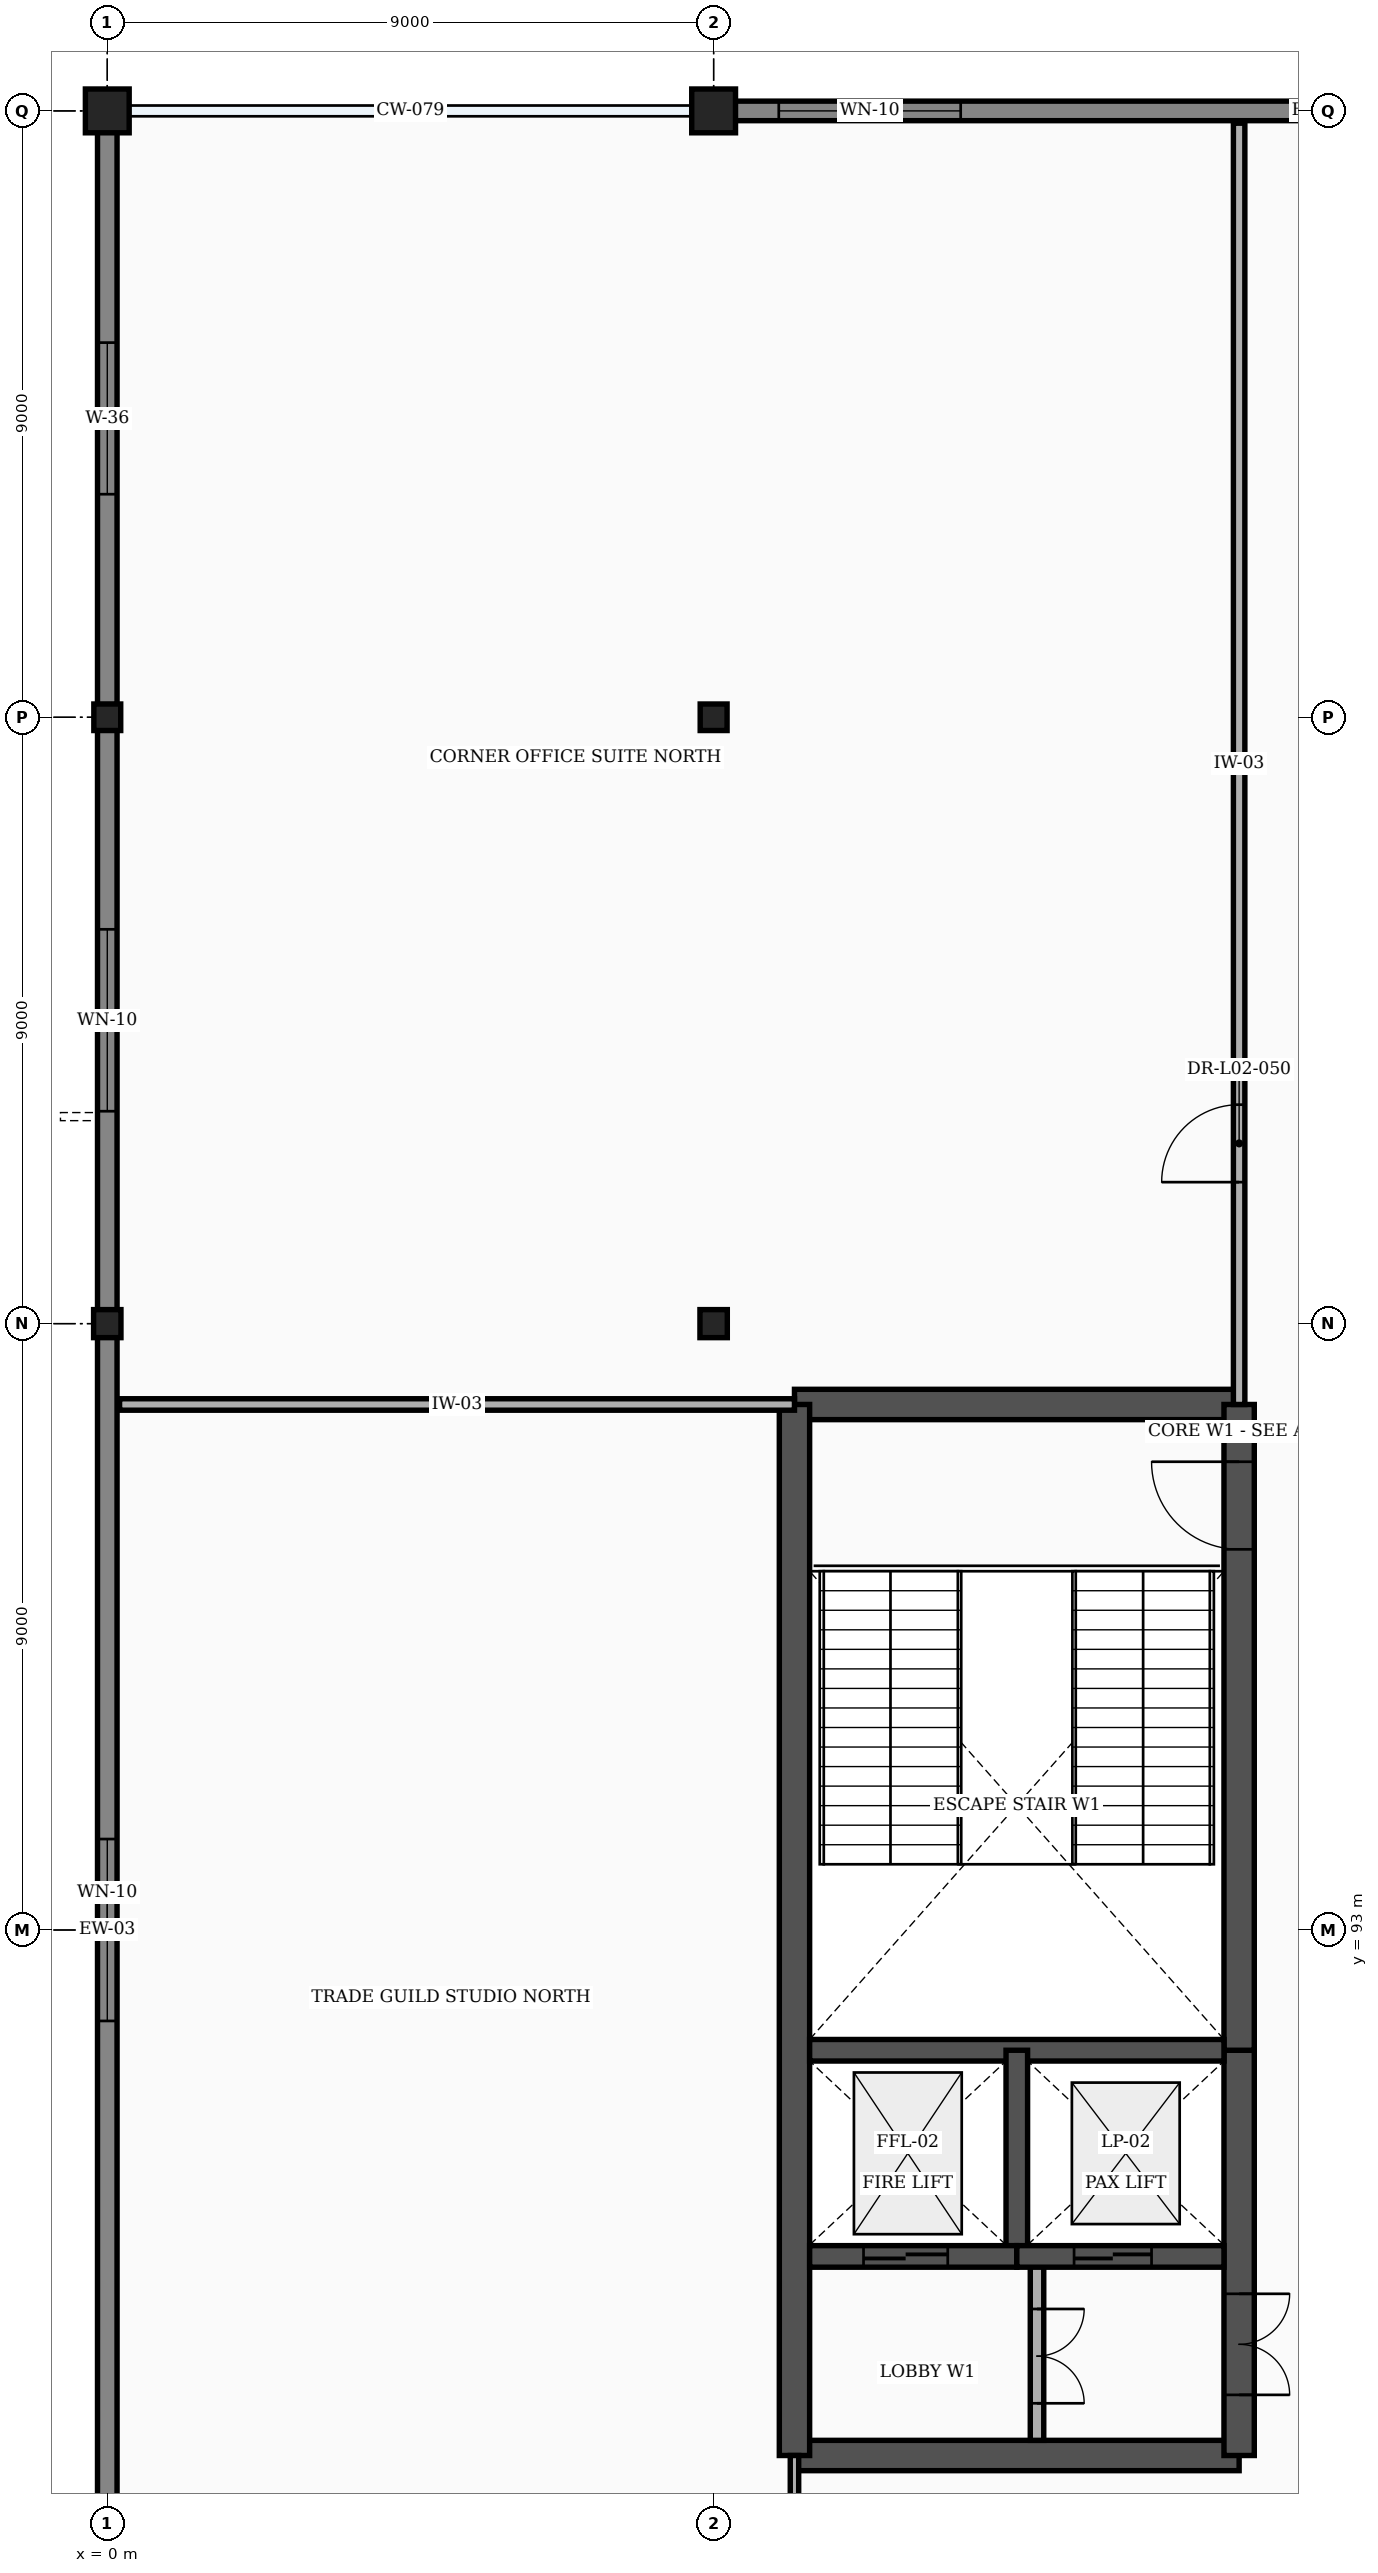
"""IFC4 building model, lengths in metres.
Left out: names, types, materials, properties, quantities, classifications, styles, units other than length and angle.
Written with IfcOpenShell. Run it as: python <this file> out.ifc"""

import sys

from ifc_helpers import new_model, si_unit, direction, frame, frame_2d, origin, origin_2d, place, context, subcontext, project, spatial, rectangle, i_section, extrude, element, fill, save


model = new_model("IFC4")
c1 = context("Model", 3, precision=1e-05, world=origin(), true_north=direction((0.0, 1.0)))
c2 = subcontext(c1, "Body", "Model", "MODEL_VIEW")
j1 = project(units=[si_unit("LENGTHUNIT", "METRE"), si_unit("PLANEANGLEUNIT", "RADIAN")], contexts=[c1])
p1 = place(None, origin())
s1 = spatial("IfcSite", under=j1, at=p1, CompositionType="ELEMENT")
p2 = place(p1, origin())
s2 = spatial("IfcBuilding", under=s1, at=p2, CompositionType="ELEMENT")
p3 = place(p2, frame((0.0, 0.0, 11.4)))
s3 = spatial("IfcBuildingStorey", under=s2, at=p3, CompositionType="ELEMENT", Elevation=11.4)
p4 = place(p3, frame((0.0, 102.0, 0.0), z_axis=(0.0, 0.0, 1.0), x_axis=(1.0, 0.0, 0.0)))
e1 = element("IfcColumn", 1, at=p4, inside=s3, PredefinedType="COLUMN", context=c2, shape_type="SweptSolid", body=[
    extrude(i_section(OverallWidth=0.406, OverallDepth=0.416, WebThickness=0.03, FlangeThickness=0.048, at=origin_2d()), origin(), (0.0, 0.0, 1.0), 5.4),
])
p5 = place(p3, frame((0.0, 111.0, 0.0), z_axis=(0.0, 0.0, 1.0), x_axis=(1.0, 0.0, 0.0)))
e2 = element("IfcColumn", 2, at=p5, inside=s3, PredefinedType="COLUMN", context=c2, shape_type="SweptSolid", body=[
    extrude(i_section(OverallWidth=0.399, OverallDepth=0.394, WebThickness=0.023, FlangeThickness=0.037, at=origin_2d()), origin(), (0.0, 0.0, 1.0), 5.4),
])
p6 = place(p3, frame((0.0, 120.0, 0.0), z_axis=(0.0, 0.0, 1.0), x_axis=(1.0, 0.0, 0.0)))
e3 = element("IfcColumn", 3, at=p6, inside=s3, PredefinedType="COLUMN", context=c2, shape_type="SweptSolid", body=[
    extrude(rectangle(XDim=0.65, YDim=0.65, at=origin_2d()), origin(), (0.0, 0.0, 1.0), 5.4),
])
p7 = place(p3, frame((9.0, 102.0, 0.0), z_axis=(0.0, 0.0, 1.0), x_axis=(1.0, 0.0, 0.0)))
e4 = element("IfcColumn", 4, at=p7, inside=s3, PredefinedType="COLUMN", context=c2, shape_type="SweptSolid", body=[
    extrude(i_section(OverallWidth=0.406, OverallDepth=0.416, WebThickness=0.03, FlangeThickness=0.048, at=origin_2d()), origin(), (0.0, 0.0, 1.0), 5.4),
])
p8 = place(p3, frame((9.0, 111.0, 0.0), z_axis=(0.0, 0.0, 1.0), x_axis=(1.0, 0.0, 0.0)))
e5 = element("IfcColumn", 5, at=p8, inside=s3, PredefinedType="COLUMN", context=c2, shape_type="SweptSolid", body=[
    extrude(i_section(OverallWidth=0.399, OverallDepth=0.394, WebThickness=0.023, FlangeThickness=0.037, at=origin_2d()), origin(), (0.0, 0.0, 1.0), 5.4),
])
p9 = place(p3, frame((9.0, 120.0, 0.0), z_axis=(0.0, 0.0, 1.0), x_axis=(1.0, 0.0, 0.0)))
e6 = element("IfcColumn", 6, at=p9, inside=s3, PredefinedType="COLUMN", context=c2, shape_type="SweptSolid", body=[
    extrude(rectangle(XDim=0.65, YDim=0.65, at=origin_2d()), origin(), (0.0, 0.0, 1.0), 5.4),
])
p10 = place(p3, frame((9.317, 120.0, 0.0), z_axis=(0.0, 0.0, 1.0), x_axis=(1.0, 0.0, 0.0)))
e7 = element("IfcWall", 7, at=p10, inside=s3, PredefinedType="STANDARD", context=c2, shape_type="SweptSolid", body=[
    extrude(rectangle(XDim=17.366, YDim=0.29, at=frame_2d((8.683, 0.0))), origin(), (0.0, 0.0, 1.0), 4.388),
])
p11 = place(p10, frame((0.65, 0.0, 0.85)))
e8 = element("IfcOpeningElement", 8, at=p11, cuts=e7, PredefinedType="OPENING", context=c2, shape_type="SweptSolid", body=[
    extrude(rectangle(XDim=2.7, YDim=2.4, at=frame_2d((1.35, 1.2))), frame((0.0, 0.157, 0.0), z_axis=(0.0, -1.0, 0.0), x_axis=(1.0, 0.0, 0.0)), (0.0, 0.0, 1.0), 0.314),
])
p12 = place(p3, frame((0.0, 84.194, 0.0), z_axis=(0.0, 0.0, 1.0), x_axis=(0.0, 1.0, 0.0)))
e9 = element("IfcWall", 9, at=p12, inside=s3, PredefinedType="STANDARD", context=c2, shape_type="SweptSolid", body=[
    extrude(rectangle(XDim=17.612, YDim=0.29, at=frame_2d((8.806, 0.0))), origin(), (0.0, 0.0, 1.0), 4.467),
])
p13 = place(p12, frame((7.456, 0.0, 0.85)))
e10 = element("IfcOpeningElement", 10, at=p13, cuts=e9, PredefinedType="OPENING", context=c2, shape_type="SweptSolid", body=[
    extrude(rectangle(XDim=2.7, YDim=2.4, at=frame_2d((1.35, 1.2))), frame((0.0, 0.157, 0.0), z_axis=(0.0, -1.0, 0.0), x_axis=(1.0, 0.0, 0.0)), (0.0, 0.0, 1.0), 0.314),
])
p14 = place(p3, frame((0.0, 102.194, 0.0), z_axis=(0.0, 0.0, 1.0), x_axis=(0.0, 1.0, 0.0)))
e11 = element("IfcWall", 11, at=p14, inside=s3, PredefinedType="STANDARD", context=c2, shape_type="SweptSolid", body=[
    extrude(rectangle(XDim=8.617, YDim=0.29, at=frame_2d((4.309, 0.0))), origin(), (0.0, 0.0, 1.0), 4.9),
])
p15 = place(p14, frame((2.959, 0.0, 0.85)))
e12 = element("IfcOpeningElement", 12, at=p15, cuts=e11, PredefinedType="OPENING", context=c2, shape_type="SweptSolid", body=[
    extrude(rectangle(XDim=2.7, YDim=2.4, at=frame_2d((1.35, 1.2))), frame((0.0, 0.157, 0.0), z_axis=(0.0, -1.0, 0.0), x_axis=(1.0, 0.0, 0.0)), (0.0, 0.0, 1.0), 0.314),
])
p16 = place(p3, frame((0.0, 111.189, 0.0), z_axis=(0.0, 0.0, 1.0), x_axis=(0.0, 1.0, 0.0)))
e13 = element("IfcWall", 13, at=p16, inside=s3, PredefinedType="STANDARD", context=c2, shape_type="SweptSolid", body=[
    extrude(rectangle(XDim=8.494, YDim=0.29, at=frame_2d((4.247, 0.0))), origin(), (0.0, 0.0, 1.0), 4.9),
])
p17 = place(p16, frame((3.122, 0.0, 0.85)))
e14 = element("IfcOpeningElement", 14, at=p17, cuts=e13, PredefinedType="OPENING", context=c2, shape_type="SweptSolid", body=[
    extrude(rectangle(XDim=2.25, YDim=2.0, at=frame_2d((1.125, 1.0))), frame((0.0, 0.157, 0.0), z_axis=(0.0, -1.0, 0.0), x_axis=(1.0, 0.0, 0.0)), (0.0, 0.0, 1.0), 0.314),
])
for number, where, z_axis, x_axis in (
    (15, (10.2, 85.2, 0.0), (0.0, 0.0, 1.0), (1.0, 0.0, 0.0)),
    (16, (10.2, 100.8, 0.0), (0.0, 0.0, 1.0), (1.0, 0.0, 0.0)),
):
    element("IfcWall", number, at=place(p3, frame(where, z_axis=z_axis, x_axis=x_axis)), inside=s3, PredefinedType="SHEAR", context=c2, shape_type="SweptSolid", body=[
        extrude(rectangle(XDim=6.6, YDim=0.45, at=frame_2d((3.3, 0.0))), origin(), (0.0, 0.0, 1.0), 5.15),
    ])
p18 = place(p3, frame((10.2, 85.2, 0.0), z_axis=(0.0, 0.0, 1.0), x_axis=(0.0, 1.0, 0.0)))
e17 = element("IfcWall", 17, at=p18, inside=s3, PredefinedType="SHEAR", context=c2, shape_type="SweptSolid", body=[
    extrude(rectangle(XDim=15.6, YDim=0.45, at=frame_2d((7.8, 0.0))), origin(), (0.0, 0.0, 1.0), 5.15),
])
p19 = place(p3, frame((16.8, 85.2, 0.0), z_axis=(0.0, 0.0, 1.0), x_axis=(0.0, 1.0, 0.0)))
e18 = element("IfcWall", 18, at=p19, inside=s3, PredefinedType="SHEAR", context=c2, shape_type="SweptSolid", body=[
    extrude(rectangle(XDim=6.015, YDim=0.45, at=frame_2d((3.008, 0.0))), origin(), (0.0, 0.0, 1.0), 5.15),
])
p20 = place(p19, frame((0.9, 0.0, 0.0)))
e19 = element("IfcOpeningElement", 19, at=p20, cuts=e18, PredefinedType="OPENING", context=c2, shape_type="SweptSolid", body=[
    extrude(rectangle(XDim=1.5, YDim=2.2, at=frame_2d((0.75, 1.1))), frame((0.0, 0.237, 0.0), z_axis=(0.0, -1.0, 0.0), x_axis=(1.0, 0.0, 0.0)), (0.0, 0.0, 1.0), 0.474),
])
p21 = place(p3, frame((16.8, 91.215, 0.0), z_axis=(0.0, 0.0, 1.0), x_axis=(0.0, 1.0, 0.0)))
e20 = element("IfcWall", 20, at=p21, inside=s3, PredefinedType="SHEAR", context=c2, shape_type="SweptSolid", body=[
    extrude(rectangle(XDim=9.585, YDim=0.45, at=frame_2d((4.792, 0.0))), origin(), (0.0, 0.0, 1.0), 5.15),
])
p22 = place(p21, frame((7.435, 0.0, 0.0)))
e21 = element("IfcOpeningElement", 21, at=p22, cuts=e20, PredefinedType="OPENING", context=c2, shape_type="SweptSolid", body=[
    extrude(rectangle(XDim=1.3, YDim=2.2, at=frame_2d((0.65, 1.1))), frame((0.0, 0.237, 0.0), z_axis=(0.0, -1.0, 0.0), x_axis=(1.0, 0.0, 0.0)), (0.0, 0.0, 1.0), 0.474),
])
p23 = place(p3, frame((10.425, 91.215, 0.0), z_axis=(0.0, 0.0, 1.0), x_axis=(1.0, 0.0, 0.0)))
e22 = element("IfcWall", 22, at=p23, inside=s3, PredefinedType="SHEAR", context=c2, shape_type="SweptSolid", body=[
    extrude(rectangle(XDim=6.15, YDim=0.32, at=frame_2d((3.075, 0.0))), origin(), (0.0, 0.0, 1.0), 5.15),
])
p24 = place(p3, frame((13.5, 88.155, 0.0), z_axis=(0.0, 0.0, 1.0), x_axis=(0.0, 1.0, 0.0)))
e23 = element("IfcWall", 23, at=p24, inside=s3, PredefinedType="SHEAR", context=c2, shape_type="SweptSolid", body=[
    extrude(rectangle(XDim=3.06, YDim=0.32, at=frame_2d((1.53, 0.0))), origin(), (0.0, 0.0, 1.0), 5.15),
])
p25 = place(p3, frame((13.8, 85.425, 0.0), z_axis=(0.0, 0.0, 1.0), x_axis=(0.0, 1.0, 0.0)))
e24 = element("IfcWall", 24, at=p25, inside=s3, PredefinedType="PARTITIONING", context=c2, shape_type="SweptSolid", body=[
    extrude(rectangle(XDim=2.73, YDim=0.2, at=frame_2d((1.365, 0.0))), origin(), (0.0, 0.0, 1.0), 5.15),
])
p26 = place(p25, frame((0.55, 0.0, 0.0)))
e25 = element("IfcOpeningElement", 25, at=p26, cuts=e24, PredefinedType="OPENING", context=c2, shape_type="SweptSolid", body=[
    extrude(rectangle(XDim=1.4, YDim=2.25, at=frame_2d((0.7, 1.125))), frame((0.0, 0.112, 0.0), z_axis=(0.0, -1.0, 0.0), x_axis=(1.0, 0.0, 0.0)), (0.0, 0.0, 1.0), 0.224),
])
p27 = place(p3, frame((10.425, 88.155, 0.0), z_axis=(0.0, 0.0, 1.0), x_axis=(1.0, 0.0, 0.0)))
e26 = element("IfcWall", 26, at=p27, inside=s3, PredefinedType="SHEAR", context=c2, shape_type="SweptSolid", body=[
    extrude(rectangle(XDim=3.075, YDim=0.32, at=frame_2d((1.538, 0.0))), origin(), (0.0, 0.0, 1.0), 5.15),
])
p28 = place(p27, frame((0.8, 0.0, 0.0)))
e27 = element("IfcOpeningElement", 27, at=p28, cuts=e26, PredefinedType="OPENING", context=c2, shape_type="SweptSolid", body=[
    extrude(rectangle(XDim=1.25, YDim=2.25, at=frame_2d((0.625, 1.125))), frame((0.0, 0.172, 0.0), z_axis=(0.0, -1.0, 0.0), x_axis=(1.0, 0.0, 0.0)), (0.0, 0.0, 1.0), 0.344),
])
p29 = place(p3, frame((13.5, 88.155, 0.0), z_axis=(0.0, 0.0, 1.0), x_axis=(1.0, 0.0, 0.0)))
e28 = element("IfcWall", 28, at=p29, inside=s3, PredefinedType="SHEAR", context=c2, shape_type="SweptSolid", body=[
    extrude(rectangle(XDim=3.075, YDim=0.32, at=frame_2d((1.538, 0.0))), origin(), (0.0, 0.0, 1.0), 5.15),
])
p30 = place(p29, frame((0.85, 0.0, 0.0)))
e29 = element("IfcOpeningElement", 29, at=p30, cuts=e28, PredefinedType="OPENING", context=c2, shape_type="SweptSolid", body=[
    extrude(rectangle(XDim=1.15, YDim=2.2, at=frame_2d((0.575, 1.1))), frame((0.0, 0.172, 0.0), z_axis=(0.0, -1.0, 0.0), x_axis=(1.0, 0.0, 0.0)), (0.0, 0.0, 1.0), 0.344),
])
p31 = place(p3, frame((10.2, 83.2, 0.0), z_axis=(0.0, 0.0, 1.0), x_axis=(0.0, 1.0, 0.0)))
e30 = element("IfcWall", 30, at=p31, inside=s3, PredefinedType="PARTITIONING", context=c2, shape_type="SweptSolid", body=[
    extrude(rectangle(XDim=2.0, YDim=0.125, at=frame_2d((1.0, 0.0))), origin(), (0.0, 0.0, 1.0), 5.15),
])
p32 = place(p3, frame((0.183, 100.8, 0.0), z_axis=(0.0, 0.0, 1.0), x_axis=(1.0, 0.0, 0.0)))
e31 = element("IfcWall", 31, at=p32, inside=s3, PredefinedType="PARTITIONING", context=c2, shape_type="SweptSolid", body=[
    extrude(rectangle(XDim=10.017, YDim=0.17, at=frame_2d((5.009, 0.0))), origin(), (0.0, 0.0, 1.0), 5.15),
])
p33 = place(p3, frame((16.8, 100.8, 0.0), z_axis=(0.0, 0.0, 1.0), x_axis=(0.0, 1.0, 0.0)))
e32 = element("IfcWall", 32, at=p33, inside=s3, PredefinedType="PARTITIONING", context=c2, shape_type="SweptSolid", body=[
    extrude(rectangle(XDim=19.017, YDim=0.17, at=frame_2d((9.509, 0.0))), origin(), (0.0, 0.0, 1.0), 5.15),
])
p34 = place(p33, frame((3.3, 0.0, 0.0)))
e33 = element("IfcOpeningElement", 33, at=p34, cuts=e32, PredefinedType="OPENING", context=c2, shape_type="SweptSolid", body=[
    extrude(rectangle(XDim=1.15, YDim=2.15, at=frame_2d((0.575, 1.075))), frame((0.0, 0.097, 0.0), z_axis=(0.0, -1.0, 0.0), x_axis=(1.0, 0.0, 0.0)), (0.0, 0.0, 1.0), 0.194),
])
p35 = place(p11, origin())
e34 = element("IfcWindow", 34, at=p35, inside=s3, PartitioningType="SINGLE_PANEL", PredefinedType="WINDOW", context=c2, shape_type="SweptSolid", body=[
    extrude(rectangle(XDim=2.7, YDim=2.4, at=frame_2d((1.35, 1.2))), frame((0.0, 0.03, 0.0), z_axis=(0.0, -1.0, 0.0), x_axis=(1.0, 0.0, 0.0)), (0.0, 0.0, 1.0), 0.06),
])
fill(e8, e34)
p36 = place(p13, origin())
e35 = element("IfcWindow", 35, at=p36, inside=s3, PartitioningType="SINGLE_PANEL", PredefinedType="WINDOW", context=c2, shape_type="SweptSolid", body=[
    extrude(rectangle(XDim=2.7, YDim=2.4, at=frame_2d((1.35, 1.2))), frame((0.0, 0.03, 0.0), z_axis=(0.0, -1.0, 0.0), x_axis=(1.0, 0.0, 0.0)), (0.0, 0.0, 1.0), 0.06),
])
fill(e10, e35)
p37 = place(p15, origin())
e36 = element("IfcWindow", 36, at=p37, inside=s3, PartitioningType="SINGLE_PANEL", PredefinedType="WINDOW", context=c2, shape_type="SweptSolid", body=[
    extrude(rectangle(XDim=2.7, YDim=2.4, at=frame_2d((1.35, 1.2))), frame((0.0, 0.03, 0.0), z_axis=(0.0, -1.0, 0.0), x_axis=(1.0, 0.0, 0.0)), (0.0, 0.0, 1.0), 0.06),
])
fill(e12, e36)
p38 = place(p17, origin())
e37 = element("IfcWindow", 37, at=p38, inside=s3, PartitioningType="SINGLE_PANEL", PredefinedType="WINDOW", context=c2, shape_type="SweptSolid", body=[
    extrude(rectangle(XDim=2.25, YDim=2.0, at=frame_2d((1.125, 1.0))), frame((0.0, 0.03, 0.0), z_axis=(0.0, -1.0, 0.0), x_axis=(1.0, 0.0, 0.0)), (0.0, 0.0, 1.0), 0.06),
])
fill(e14, e37)
p39 = place(p20, frame((1.5, 0.0, 0.0), z_axis=(0.0, 0.0, 1.0), x_axis=(-1.0, 0.0, 0.0)))
e38 = element("IfcDoor", 38, at=p39, inside=s3, OperationType="DOUBLE_DOOR_SINGLE_SWING", PredefinedType="DOOR", context=c2, shape_type="SweptSolid", body=[
    extrude(rectangle(XDim=1.5, YDim=2.2, at=frame_2d((0.75, 1.1))), frame((0.0, 0.025, 0.0), z_axis=(0.0, -1.0, 0.0), x_axis=(1.0, 0.0, 0.0)), (0.0, 0.0, 1.0), 0.05),
])
fill(e19, e38)
p40 = place(p22, origin())
e39 = element("IfcDoor", 39, at=p40, inside=s3, OperationType="SINGLE_SWING_RIGHT", PredefinedType="DOOR", context=c2, shape_type="SweptSolid", body=[
    extrude(rectangle(XDim=1.3, YDim=2.2, at=frame_2d((0.65, 1.1))), frame((0.0, 0.025, 0.0), z_axis=(0.0, -1.0, 0.0), x_axis=(1.0, 0.0, 0.0)), (0.0, 0.0, 1.0), 0.05),
])
fill(e21, e39)
p41 = place(p26, frame((1.4, 0.0, 0.0), z_axis=(0.0, 0.0, 1.0), x_axis=(-1.0, 0.0, 0.0)))
e40 = element("IfcDoor", 40, at=p41, inside=s3, OperationType="DOUBLE_DOOR_SINGLE_SWING", PredefinedType="DOOR", context=c2, shape_type="SweptSolid", body=[
    extrude(rectangle(XDim=1.4, YDim=2.25, at=frame_2d((0.7, 1.125))), frame((0.0, 0.025, 0.0), z_axis=(0.0, -1.0, 0.0), x_axis=(1.0, 0.0, 0.0)), (0.0, 0.0, 1.0), 0.05),
])
fill(e25, e40)
p42 = place(p28, origin())
e41 = element("IfcDoor", 41, at=p42, inside=s3, OperationType="DOUBLE_DOOR_SLIDING", PredefinedType="DOOR", context=c2, shape_type="SweptSolid", body=[
    extrude(rectangle(XDim=1.25, YDim=2.25, at=frame_2d((0.625, 1.125))), frame((0.0, 0.025, 0.0), z_axis=(0.0, -1.0, 0.0), x_axis=(1.0, 0.0, 0.0)), (0.0, 0.0, 1.0), 0.05),
])
fill(e27, e41)
p43 = place(p30, origin())
e42 = element("IfcDoor", 42, at=p43, inside=s3, OperationType="DOUBLE_DOOR_SLIDING", PredefinedType="DOOR", context=c2, shape_type="SweptSolid", body=[
    extrude(rectangle(XDim=1.15, YDim=2.2, at=frame_2d((0.575, 1.1))), frame((0.0, 0.025, 0.0), z_axis=(0.0, -1.0, 0.0), x_axis=(1.0, 0.0, 0.0)), (0.0, 0.0, 1.0), 0.05),
])
fill(e29, e42)
p44 = place(p34, origin())
e43 = element("IfcDoor", 43, at=p44, inside=s3, OperationType="SINGLE_SWING_LEFT", PredefinedType="DOOR", context=c2, shape_type="SweptSolid", body=[
    extrude(rectangle(XDim=1.15, YDim=2.15, at=frame_2d((0.575, 1.075))), frame((0.0, 0.025, 0.0), z_axis=(0.0, -1.0, 0.0), x_axis=(1.0, 0.0, 0.0)), (0.0, 0.0, 1.0), 0.05),
])
fill(e33, e43)
save(model, sys.argv[1])
